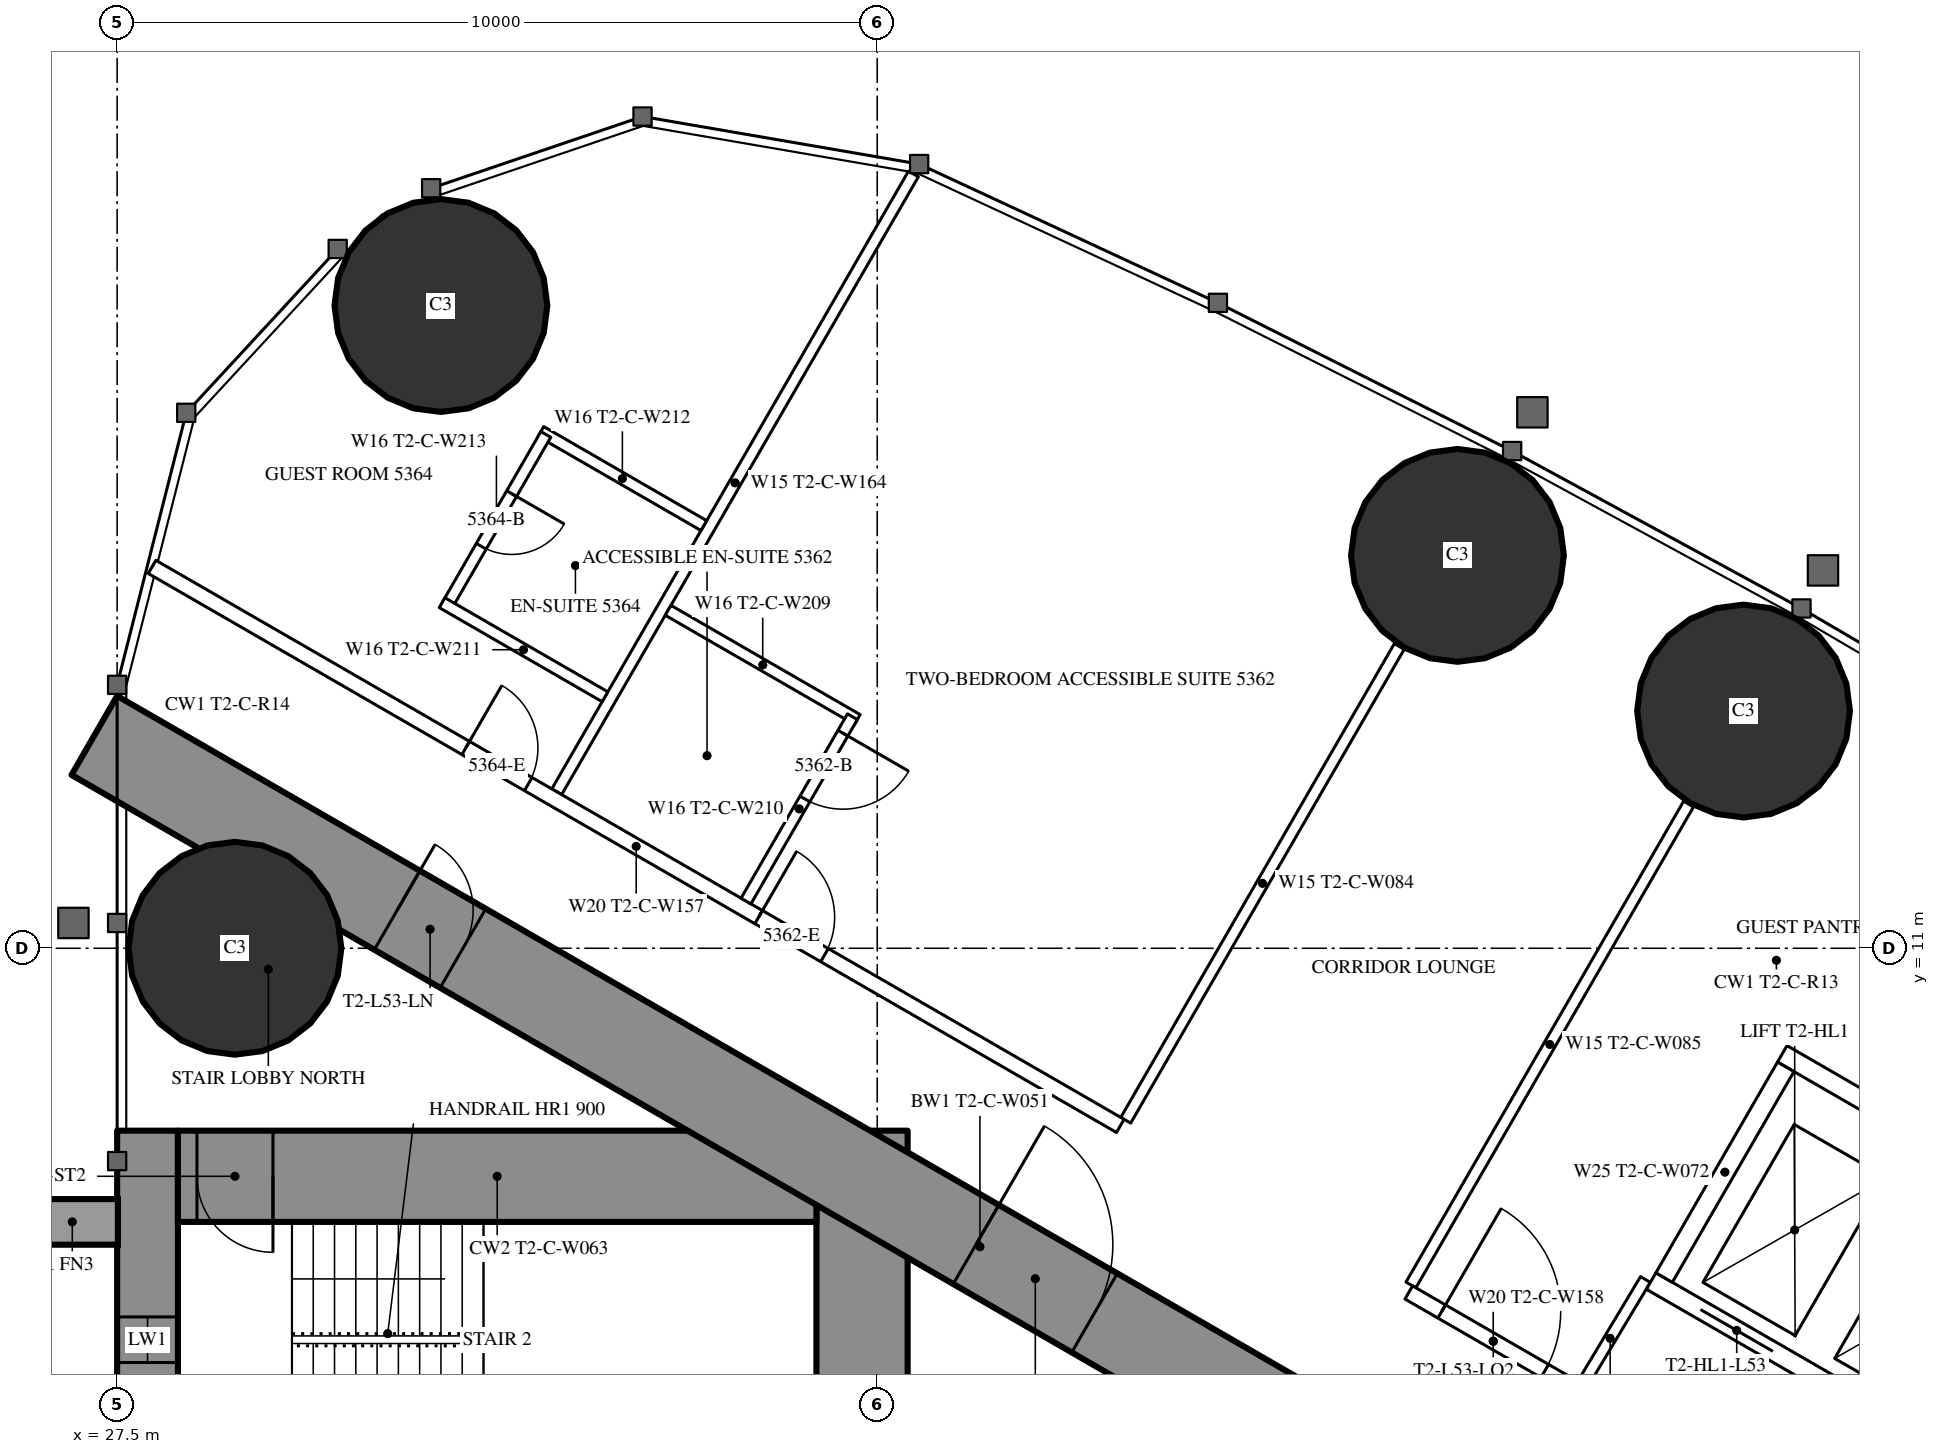
"""IFC4 building model, lengths in metres.
Left out: names, types, materials, properties, quantities, classifications, styles, units other than length and angle.
Written with IfcOpenShell. Run it as: python <this file> out.ifc"""

import sys

from ifc_helpers import new_model, si_unit, direction, frame, frame_2d, origin, origin_2d, place, context, subcontext, project, spatial, rectangle, circle, extrude, element, fill, save


model = new_model("IFC4")
c1 = context("Model", 3, precision=1e-05, world=origin(), true_north=direction((0.0, 1.0)))
c2 = subcontext(c1, "Body", "Model", "MODEL_VIEW")
j1 = project(units=[si_unit("LENGTHUNIT", "METRE"), si_unit("PLANEANGLEUNIT", "RADIAN")], contexts=[c1])
p1 = place(None, origin())
s1 = spatial("IfcSite", under=j1, at=p1, CompositionType="ELEMENT")
p2 = place(p1, origin())
s2 = spatial("IfcBuilding", under=s1, at=p2, CompositionType="ELEMENT")
p3 = place(p2, frame((0.0, 0.0, 198.3)))
s3 = spatial("IfcBuildingStorey", under=s2, at=p3, CompositionType="ELEMENT", Elevation=198.3)
for number, where, z_axis, x_axis in (
    (1, (31.76, 19.456, 0.0), (0.0, 0.0, 1.0), (1.0, 0.0, 0.0)),
    (2, (29.05, 11.0, 0.0), (0.0, 0.0, 1.0), (1.0, 0.0, 0.0)),
    (3, (48.897, 14.121, 0.0), (0.0, 0.0, 1.0), (1.0, 0.0, 0.0)),
    (4, (45.134, 16.168, 0.0), (0.0, 0.0, 1.0), (1.0, 0.0, 0.0)),
):
    element("IfcColumn", number, at=place(p3, frame(where, z_axis=z_axis, x_axis=x_axis)), inside=s3, PredefinedType="COLUMN", context=c2, shape_type="SweptSolid", body=[
        extrude(circle(Radius=1.4, at=origin_2d()), origin(), (0.0, 0.0, 1.0), 3.5),
    ])
p4 = place(p3, frame((27.9, -8.6, 0.0), z_axis=(0.0, 0.0, 1.0), x_axis=(0.0, 1.0, 0.0)))
e5 = element("IfcWall", 5, at=p4, inside=s3, PredefinedType="SHEAR", context=c2, shape_type="SweptSolid", body=[
    extrude(rectangle(XDim=17.2, YDim=0.8, at=frame_2d((8.6, 0.0))), origin(), (0.0, 0.0, 1.0), 3.5),
])
p5 = place(p4, frame((2.45, 0.0, 0.6)))
e6 = element("IfcOpeningElement", 6, at=p5, cuts=e5, PredefinedType="OPENING", context=c2, shape_type="SweptSolid", body=[
    extrude(rectangle(XDim=0.6, YDim=2.1, at=frame_2d((0.3, 1.05))), frame((0.0, 0.41, 0.0), z_axis=(0.0, -1.0, 0.0), x_axis=(1.0, 0.0, 0.0)), (0.0, 0.0, 1.0), 0.82),
])
p6 = place(p4, frame((14.15, 0.0, 0.6)))
e7 = element("IfcOpeningElement", 7, at=p6, cuts=e5, PredefinedType="OPENING", context=c2, shape_type="SweptSolid", body=[
    extrude(rectangle(XDim=0.6, YDim=2.1, at=frame_2d((0.3, 1.05))), frame((0.0, 0.41, 0.0), z_axis=(0.0, -1.0, 0.0), x_axis=(1.0, 0.0, 0.0)), (0.0, 0.0, 1.0), 0.82),
])
p7 = place(p3, frame((37.3, -8.6, 0.0), z_axis=(0.0, 0.0, 1.0), x_axis=(0.0, 1.0, 0.0)))
e8 = element("IfcWall", 8, at=p7, inside=s3, PredefinedType="SHEAR", context=c2, shape_type="SweptSolid", body=[
    extrude(rectangle(XDim=17.2, YDim=1.2, at=frame_2d((8.6, 0.0))), origin(), (0.0, 0.0, 1.0), 3.5),
])
p8 = place(p7, frame((7.7, 0.0, 0.0)))
e9 = element("IfcOpeningElement", 9, at=p8, cuts=e8, PredefinedType="OPENING", context=c2, shape_type="SweptSolid", body=[
    extrude(rectangle(XDim=1.8, YDim=2.2, at=frame_2d((0.9, 1.1))), frame((0.0, 0.61, 0.0), z_axis=(0.0, -1.0, 0.0), x_axis=(1.0, 0.0, 0.0)), (0.0, 0.0, 1.0), 1.22),
])
p9 = place(p3, frame((28.3, 8.0, 0.0), z_axis=(0.0, 0.0, 1.0), x_axis=(1.0, 0.0, 0.0)))
e10 = element("IfcWall", 10, at=p9, inside=s3, PredefinedType="SHEAR", context=c2, shape_type="SweptSolid", body=[
    extrude(rectangle(XDim=8.4, YDim=1.2, at=frame_2d((4.2, 0.0))), origin(), (0.0, 0.0, 1.0), 3.5),
])
p10 = place(p9, frame((0.25, 0.0, 0.0)))
e11 = element("IfcOpeningElement", 11, at=p10, cuts=e10, PredefinedType="OPENING", context=c2, shape_type="SweptSolid", body=[
    extrude(rectangle(XDim=1.0, YDim=2.2, at=frame_2d((0.5, 1.1))), frame((0.0, 0.61, 0.0), z_axis=(0.0, -1.0, 0.0), x_axis=(1.0, 0.0, 0.0)), (0.0, 0.0, 1.0), 1.22),
])
p11 = place(p3, frame((27.2, 13.8, 0.0), z_axis=(0.0, 0.0, 1.0), x_axis=(0.866024515034, -0.500001539357, 0.0)))
e12 = element("IfcWall", 12, at=p11, inside=s3, PredefinedType="SHEAR", context=c2, shape_type="SweptSolid", body=[
    extrude(rectangle(XDim=26.907, YDim=1.2, at=frame_2d((13.454, 0.0))), origin(), (0.0, 0.0, 1.0), 3.5),
])
p12 = place(p11, frame((4.6, 0.0, 0.0)))
e13 = element("IfcOpeningElement", 13, at=p12, cuts=e12, PredefinedType="OPENING", context=c2, shape_type="SweptSolid", body=[
    extrude(rectangle(XDim=1.0, YDim=2.2, at=frame_2d((0.5, 1.1))), frame((0.0, 0.61, 0.0), z_axis=(0.0, -1.0, 0.0), x_axis=(1.0, 0.0, 0.0)), (0.0, 0.0, 1.0), 1.22),
])
p13 = place(p11, frame((13.395, 0.0, 0.0)))
e14 = element("IfcOpeningElement", 14, at=p13, cuts=e12, PredefinedType="OPENING", context=c2, shape_type="SweptSolid", body=[
    extrude(rectangle(XDim=1.8, YDim=2.2, at=frame_2d((0.9, 1.1))), frame((0.0, 0.61, 0.0), z_axis=(0.0, -1.0, 0.0), x_axis=(1.0, 0.0, 0.0)), (0.0, 0.0, 1.0), 1.22),
])
p14 = place(p3, frame((33.284, 13.059, 0.0), z_axis=(0.0, 0.0, 1.0), x_axis=(0.499985904184, 0.866033541855, 0.0)))
e15 = element("IfcWall", 15, at=p14, inside=s3, PredefinedType="PARTITIONING", context=c2, shape_type="SweptSolid", body=[
    extrude(rectangle(XDim=9.385, YDim=0.15, at=frame_2d((4.693, 0.0))), origin(), (0.0, 0.0, 1.0), 3.25),
])
p15 = place(p3, frame((40.769, 8.737, 0.0), z_axis=(0.0, 0.0, 1.0), x_axis=(0.500013115284, 0.866017831539, 0.0)))
e16 = element("IfcWall", 16, at=p15, inside=s3, PredefinedType="PARTITIONING", context=c2, shape_type="SweptSolid", body=[
    extrude(rectangle(XDim=7.198, YDim=0.15, at=frame_2d((3.599, 0.0))), origin(), (0.0, 0.0, 1.0), 2.3),
])
p16 = place(p3, frame((44.521, 6.571, 0.0), z_axis=(0.0, 0.0, 1.0), x_axis=(0.500020376429, 0.866013639128, 0.0)))
e17 = element("IfcWall", 17, at=p16, inside=s3, PredefinedType="PARTITIONING", context=c2, shape_type="SweptSolid", body=[
    extrude(rectangle(XDim=7.306, YDim=0.15, at=frame_2d((3.653, 0.0))), origin(), (0.0, 0.0, 1.0), 2.3),
])
p17 = place(p3, frame((47.606, 6.643, 0.0), z_axis=(0.0, 0.0, 1.0), x_axis=(-0.514237157483, -0.857648031458, 0.0)))
e18 = element("IfcWall", 18, at=p17, inside=s3, PredefinedType="PARTITIONING", context=c2, shape_type="SweptSolid", body=[
    extrude(rectangle(XDim=1.805, YDim=0.15, at=frame_2d((0.902, 0.0))), origin(), (0.0, 0.0, 1.0), 3.25),
])
p18 = place(p3, frame((27.959, 16.017, 0.0), z_axis=(0.0, 0.0, 1.0), x_axis=(0.866024165033, -0.500002145574, 0.0)))
e19 = element("IfcWall", 19, at=p18, inside=s3, PredefinedType="PARTITIONING", context=c2, shape_type="SweptSolid", body=[
    extrude(rectangle(XDim=14.709, YDim=0.2, at=frame_2d((7.354, 0.0))), origin(), (0.0, 0.0, 1.0), 3.25),
])
p19 = place(p18, frame((9.215, 0.0, 0.0)))
e20 = element("IfcOpeningElement", 20, at=p19, cuts=e19, PredefinedType="OPENING", context=c2, shape_type="SweptSolid", body=[
    extrude(rectangle(XDim=1.0, YDim=2.2, at=frame_2d((0.5, 1.1))), frame((0.0, 0.11, 0.0), z_axis=(0.0, -1.0, 0.0), x_axis=(1.0, 0.0, 0.0)), (0.0, 0.0, 1.0), 0.22),
])
p20 = place(p18, frame((4.765, 0.0, 0.0)))
e21 = element("IfcOpeningElement", 21, at=p20, cuts=e19, PredefinedType="OPENING", context=c2, shape_type="SweptSolid", body=[
    extrude(rectangle(XDim=0.95, YDim=2.2, at=frame_2d((0.475, 1.1))), frame((0.0, 0.11, 0.0), z_axis=(0.0, -1.0, 0.0), x_axis=(1.0, 0.0, 0.0)), (0.0, 0.0, 1.0), 0.22),
])
p21 = place(p3, frame((44.493, 6.472, 0.0), z_axis=(0.0, 0.0, 1.0), x_axis=(0.866027140358, -0.499996992154, 0.0)))
e22 = element("IfcWall", 22, at=p21, inside=s3, PredefinedType="PARTITIONING", context=c2, shape_type="SweptSolid", body=[
    extrude(rectangle(XDim=2.566, YDim=0.2, at=frame_2d((1.283, 0.0))), origin(), (0.0, 0.0, 1.0), 3.25),
])
p22 = place(p21, frame((0.5, 0.0, 0.0)))
e23 = element("IfcOpeningElement", 23, at=p22, cuts=e22, PredefinedType="OPENING", context=c2, shape_type="SweptSolid", body=[
    extrude(rectangle(XDim=1.566, YDim=2.2, at=frame_2d((0.783, 1.1))), frame((0.0, 0.11, 0.0), z_axis=(0.0, -1.0, 0.0), x_axis=(1.0, 0.0, 0.0)), (0.0, 0.0, 1.0), 0.22),
])
p23 = place(p3, frame((34.749, 15.446, 0.0), z_axis=(0.0, 0.0, 1.0), x_axis=(0.866018712932, -0.500011588718, 0.0)))
e24 = element("IfcWall", 24, at=p23, inside=s3, PredefinedType="PARTITIONING", context=c2, shape_type="SweptSolid", body=[
    extrude(rectangle(XDim=2.875, YDim=0.15, at=frame_2d((1.438, 0.0))), origin(), (0.0, 0.0, 1.0), 3.25),
])
p24 = place(p3, frame((35.773, 11.621, 0.0), z_axis=(0.0, 0.0, 1.0), x_axis=(0.49998411664, 0.866034573852, 0.0)))
e25 = element("IfcWall", 25, at=p24, inside=s3, PredefinedType="PARTITIONING", context=c2, shape_type="SweptSolid", body=[
    extrude(rectangle(XDim=2.8, YDim=0.15, at=frame_2d((1.4, 0.0))), origin(), (0.0, 0.0, 1.0), 3.25),
])
p25 = place(p24, frame((1.55, 0.0, 0.0)))
e26 = element("IfcOpeningElement", 26, at=p25, cuts=e25, PredefinedType="OPENING", context=c2, shape_type="SweptSolid", body=[
    extrude(rectangle(XDim=1.0, YDim=2.2, at=frame_2d((0.5, 1.1))), frame((0.0, 0.085, 0.0), z_axis=(0.0, -1.0, 0.0), x_axis=(1.0, 0.0, 0.0)), (0.0, 0.0, 1.0), 0.17),
])
p26 = place(p3, frame((33.075, 17.798, 0.0), z_axis=(0.0, 0.0, 1.0), x_axis=(0.866006523861, -0.500032699561, 0.0)))
e27 = element("IfcWall", 27, at=p26, inside=s3, PredefinedType="PARTITIONING", context=c2, shape_type="SweptSolid", body=[
    extrude(rectangle(XDim=2.475, YDim=0.15, at=frame_2d((1.237, 0.0))), origin(), (0.0, 0.0, 1.0), 3.25),
])
p27 = place(p3, frame((31.84, 15.509, 0.0), z_axis=(0.0, 0.0, 1.0), x_axis=(0.500006934395, 0.866021400173, 0.0)))
e28 = element("IfcWall", 28, at=p27, inside=s3, PredefinedType="PARTITIONING", context=c2, shape_type="SweptSolid", body=[
    extrude(rectangle(XDim=2.6, YDim=0.15, at=frame_2d((1.3, 0.0))), origin(), (0.0, 0.0, 1.0), 3.25),
])
p28 = place(p27, frame((0.9, 0.0, 0.0)))
e29 = element("IfcOpeningElement", 29, at=p28, cuts=e28, PredefinedType="OPENING", context=c2, shape_type="SweptSolid", body=[
    extrude(rectangle(XDim=0.8, YDim=2.2, at=frame_2d((0.4, 1.1))), frame((0.0, 0.085, 0.0), z_axis=(0.0, -1.0, 0.0), x_axis=(1.0, 0.0, 0.0)), (0.0, 0.0, 1.0), 0.17),
])
p29 = place(p3, frame((31.775, 15.546, 0.0), z_axis=(0.0, 0.0, 1.0), x_axis=(0.866031185235, -0.4999899861, 0.0)))
e30 = element("IfcWall", 30, at=p29, inside=s3, PredefinedType="PARTITIONING", context=c2, shape_type="SweptSolid", body=[
    extrude(rectangle(XDim=2.475, YDim=0.15, at=frame_2d((1.238, 0.0))), origin(), (0.0, 0.0, 1.0), 3.25),
])
p30 = place(p3, frame((47.681, 6.622, 0.0), z_axis=(0.0, 0.0, 1.0), x_axis=(0.86603344179, -0.499986077507, 0.0)))
e31 = element("IfcWall", 31, at=p30, inside=s3, PredefinedType="PARTITIONING", context=c2, shape_type="SweptSolid", body=[
    extrude(rectangle(XDim=6.6, YDim=0.25, at=frame_2d((3.3, 0.0))), origin(), (0.0, 0.0, 1.0), 3.25),
])
p31 = place(p30, frame((0.75, 0.0, 0.0)))
e32 = element("IfcOpeningElement", 32, at=p31, cuts=e31, PredefinedType="OPENING", context=c2, shape_type="SweptSolid", body=[
    extrude(rectangle(XDim=1.1, YDim=2.2, at=frame_2d((0.55, 1.1))), frame((0.0, 0.135, 0.0), z_axis=(0.0, -1.0, 0.0), x_axis=(1.0, 0.0, 0.0)), (0.0, 0.0, 1.0), 0.27),
])
p32 = place(p30, frame((2.75, 0.0, 0.0)))
e33 = element("IfcOpeningElement", 33, at=p32, cuts=e31, PredefinedType="OPENING", context=c2, shape_type="SweptSolid", body=[
    extrude(rectangle(XDim=1.1, YDim=2.2, at=frame_2d((0.55, 1.1))), frame((0.0, 0.135, 0.0), z_axis=(0.0, -1.0, 0.0), x_axis=(1.0, 0.0, 0.0)), (0.0, 0.0, 1.0), 0.27),
])
p33 = place(p30, frame((4.75, 0.0, 0.0)))
e34 = element("IfcOpeningElement", 34, at=p33, cuts=e31, PredefinedType="OPENING", context=c2, shape_type="SweptSolid", body=[
    extrude(rectangle(XDim=1.1, YDim=2.2, at=frame_2d((0.55, 1.1))), frame((0.0, 0.135, 0.0), z_axis=(0.0, -1.0, 0.0), x_axis=(1.0, 0.0, 0.0)), (0.0, 0.0, 1.0), 0.27),
])
p34 = place(p3, frame((49.406, 9.611, 0.0), z_axis=(0.0, 0.0, 1.0), x_axis=(0.86603344179, -0.499986077507, 0.0)))
e35 = element("IfcWall", 35, at=p34, inside=s3, PredefinedType="PARTITIONING", context=c2, shape_type="SweptSolid", body=[
    extrude(rectangle(XDim=6.6, YDim=0.25, at=frame_2d((3.3, 0.0))), origin(), (0.0, 0.0, 1.0), 3.25),
])
p35 = place(p3, frame((47.852, 6.668, 0.0), z_axis=(0.0, 0.0, 1.0), x_axis=(0.499929347863, 0.866066190972, 0.0)))
e36 = element("IfcWall", 36, at=p35, inside=s3, PredefinedType="PARTITIONING", context=c2, shape_type="SweptSolid", body=[
    extrude(rectangle(XDim=3.201, YDim=0.25, at=frame_2d((1.6, 0.0))), origin(), (0.0, 0.0, 1.0), 3.25),
])
p36 = place(p25, origin())
e37 = element("IfcDoor", 37, at=p36, inside=s3, OperationType="SINGLE_SWING_RIGHT", PredefinedType="DOOR", context=c2, shape_type="SweptSolid", body=[
    extrude(rectangle(XDim=1.0, YDim=2.2, at=frame_2d((0.5, 1.1))), frame((0.0, 0.025, 0.0), z_axis=(0.0, -1.0, 0.0), x_axis=(1.0, 0.0, 0.0)), (0.0, 0.0, 1.0), 0.05),
])
fill(e26, e37)
p37 = place(p19, origin())
e38 = element("IfcDoor", 38, at=p37, inside=s3, OperationType="SINGLE_SWING_LEFT", PredefinedType="DOOR", context=c2, shape_type="SweptSolid", body=[
    extrude(rectangle(XDim=1.0, YDim=2.2, at=frame_2d((0.5, 1.1))), frame((0.0, 0.025, 0.0), z_axis=(0.0, -1.0, 0.0), x_axis=(1.0, 0.0, 0.0)), (0.0, 0.0, 1.0), 0.05),
])
fill(e20, e38)
p38 = place(p28, origin())
e39 = element("IfcDoor", 39, at=p38, inside=s3, OperationType="SINGLE_SWING_RIGHT", PredefinedType="DOOR", context=c2, shape_type="SweptSolid", body=[
    extrude(rectangle(XDim=0.8, YDim=2.2, at=frame_2d((0.4, 1.1))), frame((0.0, 0.025, 0.0), z_axis=(0.0, -1.0, 0.0), x_axis=(1.0, 0.0, 0.0)), (0.0, 0.0, 1.0), 0.05),
])
fill(e29, e39)
p39 = place(p20, origin())
e40 = element("IfcDoor", 40, at=p39, inside=s3, OperationType="SINGLE_SWING_LEFT", PredefinedType="DOOR", context=c2, shape_type="SweptSolid", body=[
    extrude(rectangle(XDim=0.95, YDim=2.2, at=frame_2d((0.475, 1.1))), frame((0.0, 0.025, 0.0), z_axis=(0.0, -1.0, 0.0), x_axis=(1.0, 0.0, 0.0)), (0.0, 0.0, 1.0), 0.05),
])
fill(e21, e40)
p40 = place(p22, origin())
e41 = element("IfcDoor", 41, at=p40, inside=s3, OperationType="SINGLE_SWING_LEFT", PredefinedType="DOOR", context=c2, shape_type="SweptSolid", body=[
    extrude(rectangle(XDim=1.566, YDim=2.2, at=frame_2d((0.783, 1.1))), frame((0.0, 0.025, 0.0), z_axis=(0.0, -1.0, 0.0), x_axis=(1.0, 0.0, 0.0)), (0.0, 0.0, 1.0), 0.05),
])
fill(e23, e41)
p41 = place(p12, origin())
e42 = element("IfcDoor", 42, at=p41, inside=s3, OperationType="SINGLE_SWING_LEFT", PredefinedType="DOOR", context=c2, shape_type="SweptSolid", body=[
    extrude(rectangle(XDim=1.0, YDim=2.2, at=frame_2d((0.5, 1.1))), frame((0.0, 0.025, 0.0), z_axis=(0.0, -1.0, 0.0), x_axis=(1.0, 0.0, 0.0)), (0.0, 0.0, 1.0), 0.05),
])
fill(e13, e42)
p42 = place(p13, origin())
e43 = element("IfcDoor", 43, at=p42, inside=s3, OperationType="DOUBLE_DOOR_SINGLE_SWING", PredefinedType="DOOR", context=c2, shape_type="SweptSolid", body=[
    extrude(rectangle(XDim=1.8, YDim=2.2, at=frame_2d((0.9, 1.1))), frame((0.0, 0.025, 0.0), z_axis=(0.0, -1.0, 0.0), x_axis=(1.0, 0.0, 0.0)), (0.0, 0.0, 1.0), 0.05),
])
fill(e14, e43)
p43 = place(p10, origin())
e44 = element("IfcDoor", 44, at=p43, inside=s3, OperationType="SINGLE_SWING_RIGHT", PredefinedType="DOOR", context=c2, shape_type="SweptSolid", body=[
    extrude(rectangle(XDim=1.0, YDim=2.2, at=frame_2d((0.5, 1.1))), frame((0.0, 0.025, 0.0), z_axis=(0.0, -1.0, 0.0), x_axis=(1.0, 0.0, 0.0)), (0.0, 0.0, 1.0), 0.05),
])
fill(e11, e44)
p44 = place(p31, origin())
e45 = element("IfcDoor", 45, at=p44, inside=s3, OperationType="DOUBLE_DOOR_SLIDING", PredefinedType="USERDEFINED", context=c2, shape_type="SweptSolid", body=[
    extrude(rectangle(XDim=1.1, YDim=2.2, at=frame_2d((0.55, 1.1))), frame((0.0, 0.025, 0.0), z_axis=(0.0, -1.0, 0.0), x_axis=(1.0, 0.0, 0.0)), (0.0, 0.0, 1.0), 0.05),
])
fill(e32, e45)
p45 = place(p6, origin())
e46 = element("IfcWindow", 46, at=p45, inside=s3, PartitioningType="SINGLE_PANEL", PredefinedType="WINDOW", context=c2, shape_type="SweptSolid", body=[
    extrude(rectangle(XDim=0.6, YDim=2.1, at=frame_2d((0.3, 1.05))), frame((0.0, 0.03, 0.0), z_axis=(0.0, -1.0, 0.0), x_axis=(1.0, 0.0, 0.0)), (0.0, 0.0, 1.0), 0.06),
])
fill(e7, e46)
save(model, sys.argv[1])
